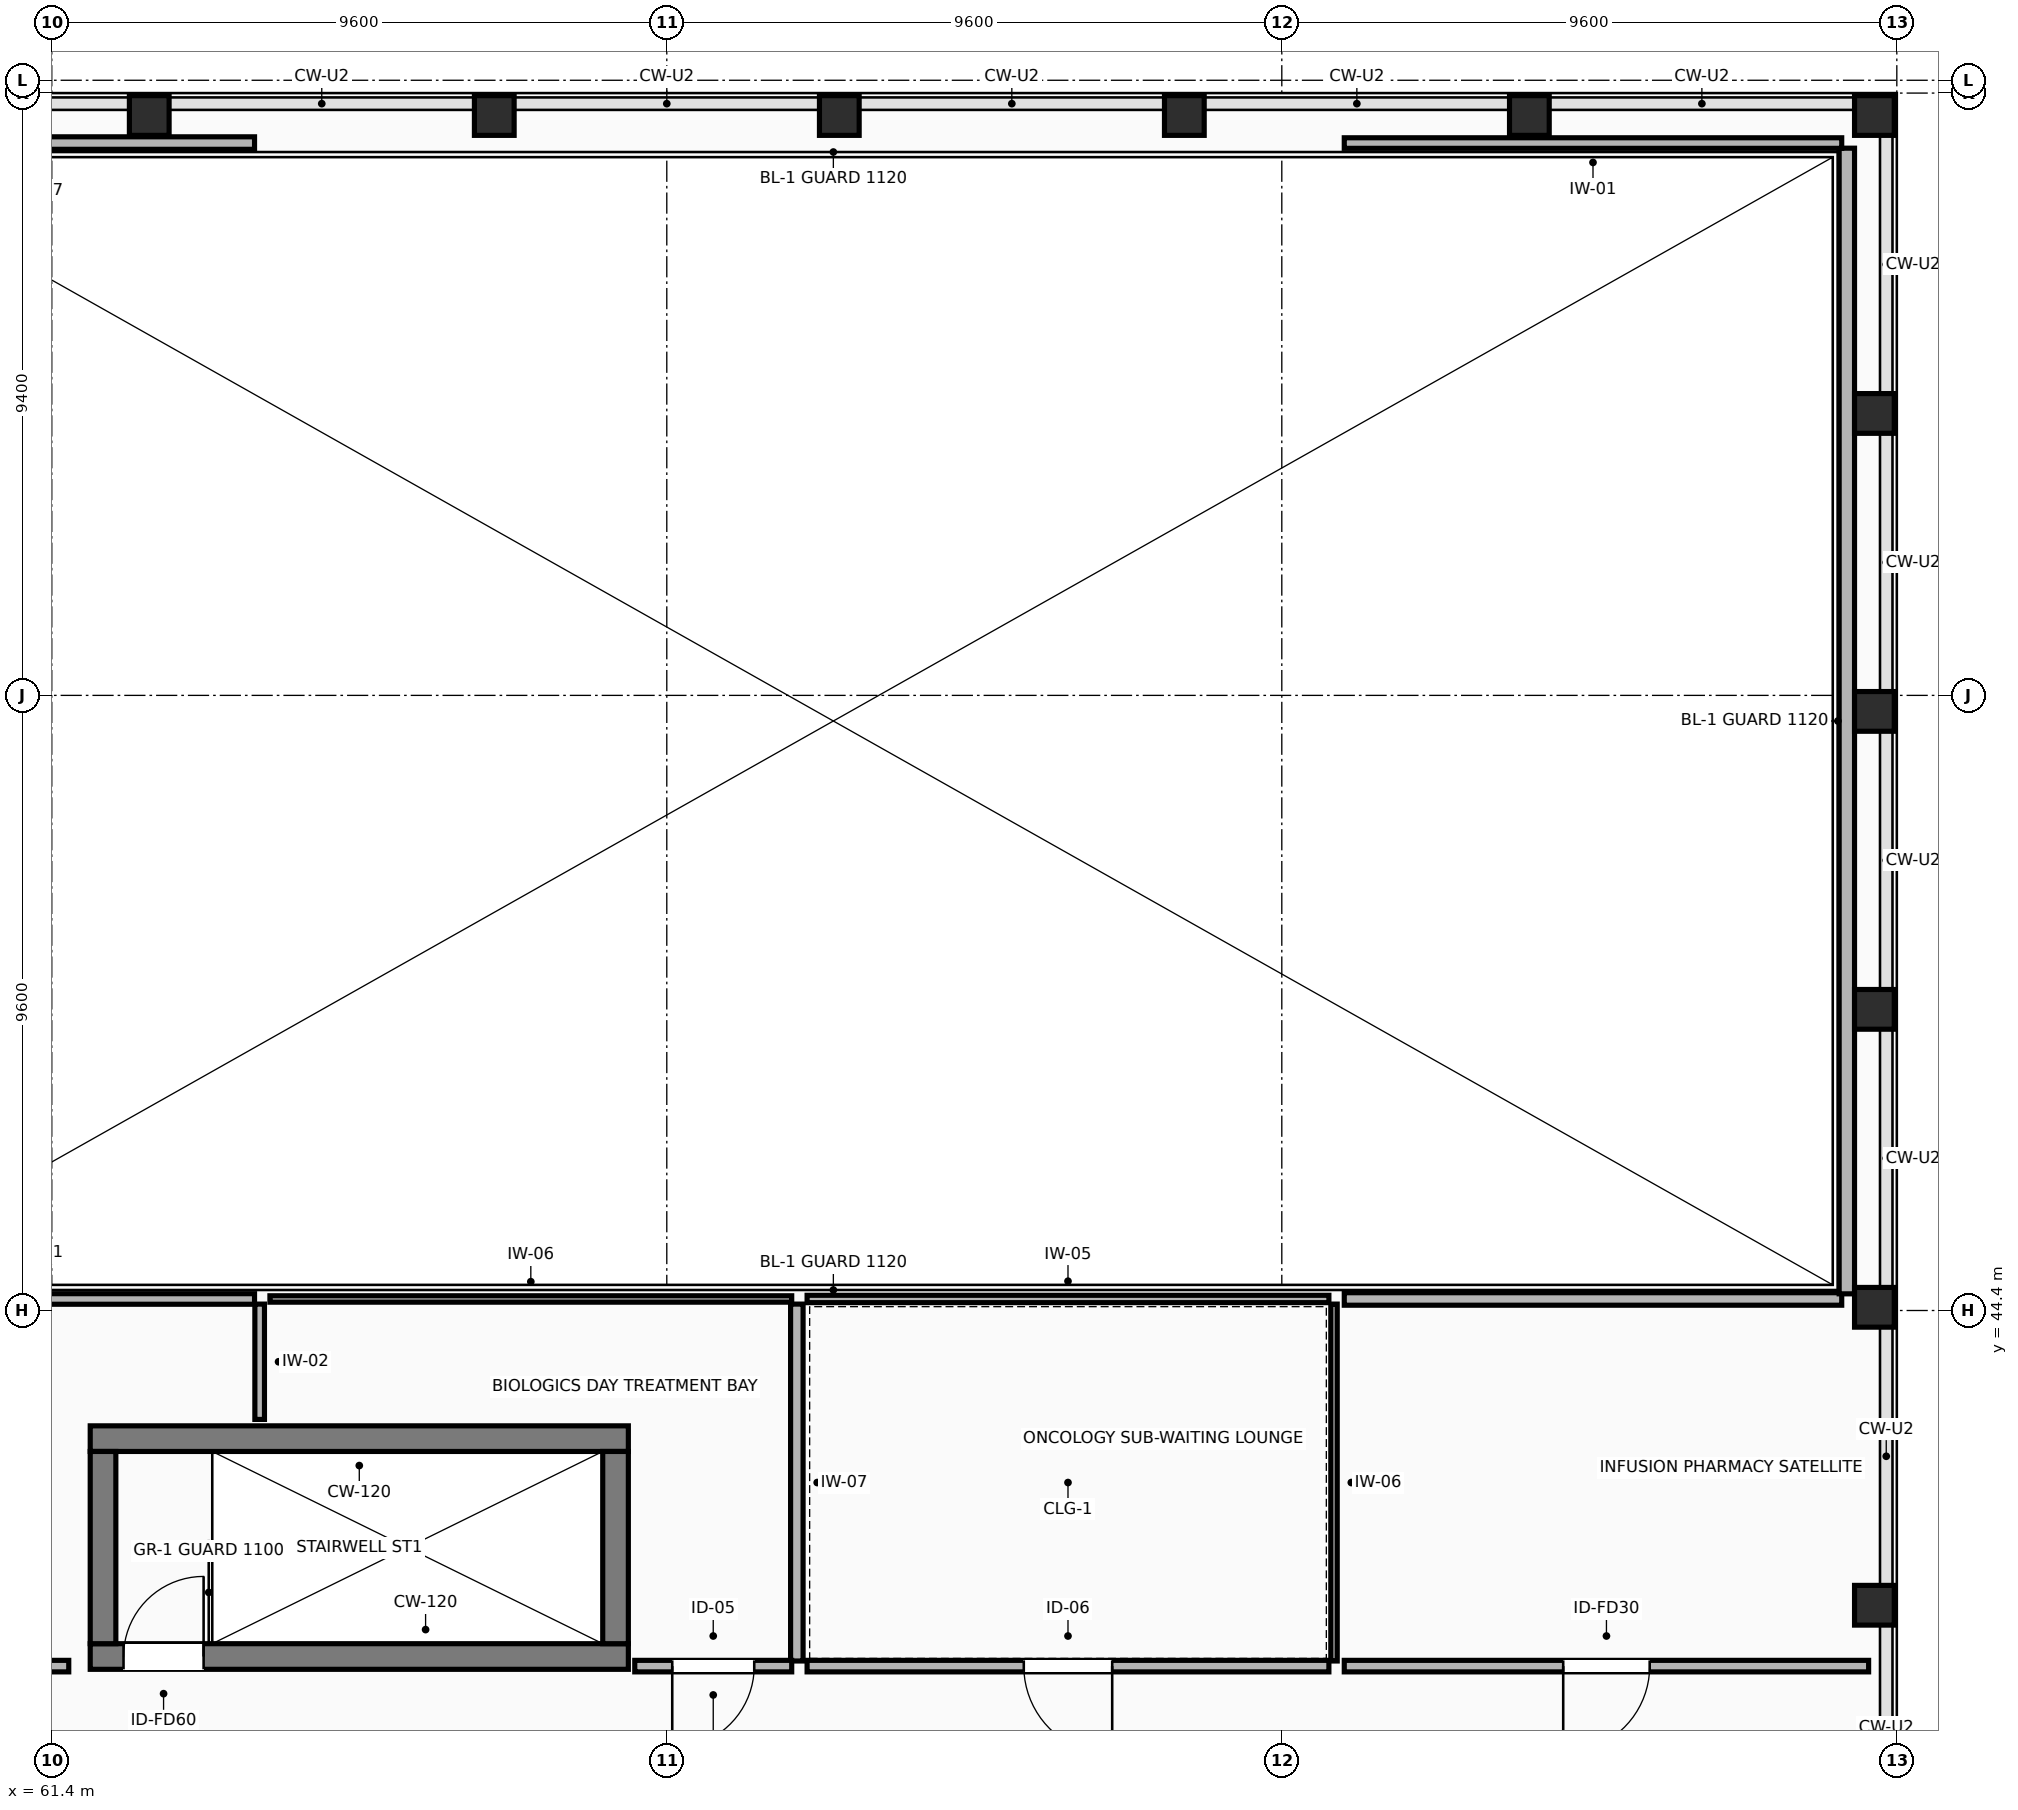
"""IFC4 building model, lengths in metres.
Left out: names, types, materials, properties, quantities, classifications, styles, units other than length and angle.
Written with IfcOpenShell. Run it as: python <this file> out.ifc"""

import sys

from ifc_helpers import new_model, si_unit, direction, frame, frame_2d, origin, origin_2d, place, context, subcontext, project, spatial, rectangle, circle, extrude, element, fill, save


model = new_model("IFC4")
c1 = context("Model", 3, precision=1e-05, world=origin(), true_north=direction((0.0, 1.0)))
c2 = subcontext(c1, "Body", "Model", "MODEL_VIEW")
j1 = project(units=[si_unit("LENGTHUNIT", "METRE"), si_unit("PLANEANGLEUNIT", "RADIAN")], contexts=[c1])
p1 = place(None, origin())
s1 = spatial("IfcSite", under=j1, at=p1, CompositionType="ELEMENT")
p2 = place(p1, origin())
s2 = spatial("IfcBuilding", under=s1, at=p2, CompositionType="ELEMENT")
p3 = place(p2, frame((0.0, 0.0, 5.4)))
s3 = spatial("IfcBuildingStorey", under=s2, at=p3, CompositionType="ELEMENT", Elevation=5.4)
for number, where, z_axis, x_axis in (
    (1, (62.921, 63.05, 0.0), (0.0, 0.0, 1.0), (1.0, 0.0, 0.0)),
    (2, (68.307, 63.05, 0.0), (0.0, 0.0, 1.0), (1.0, 0.0, 0.0)),
    (3, (73.693, 63.05, 0.0), (0.0, 0.0, 1.0), (1.0, 0.0, 0.0)),
    (4, (79.079, 63.05, 0.0), (0.0, 0.0, 1.0), (1.0, 0.0, 0.0)),
    (5, (84.464, 63.05, 0.0), (0.0, 0.0, 1.0), (1.0, 0.0, 0.0)),
    (6, (89.85, 39.8, 0.0), (0.0, 0.0, 1.0), (1.0, 0.0, 0.0)),
    (7, (89.85, 44.45, 0.0), (0.0, 0.0, 1.0), (1.0, 0.0, 0.0)),
    (8, (89.85, 49.1, 0.0), (0.0, 0.0, 1.0), (1.0, 0.0, 0.0)),
    (9, (89.85, 53.75, 0.0), (0.0, 0.0, 1.0), (1.0, 0.0, 0.0)),
    (10, (89.85, 58.4, 0.0), (0.0, 0.0, 1.0), (1.0, 0.0, 0.0)),
    (11, (89.85, 63.05, 0.0), (0.0, 0.0, 1.0), (1.0, 0.0, 0.0)),
):
    element("IfcColumn", number, at=place(p3, frame(where, z_axis=z_axis, x_axis=x_axis)), inside=s3, PredefinedType="COLUMN", context=c2, shape_type="SweptSolid", body=[
        extrude(circle(Radius=0.31, at=origin_2d()), origin(), (0.0, 0.0, 1.0), 4.2),
    ])
p4 = place(p3, frame((62.0, 39.0, 0.0), z_axis=(0.0, 0.0, 1.0), x_axis=(1.0, 0.0, 0.0)))
e12 = element("IfcWall", 12, at=p4, inside=s3, PredefinedType="SHEAR", context=c2, shape_type="SweptSolid", body=[
    extrude(rectangle(XDim=8.4, YDim=0.4, at=frame_2d((4.2, 0.0))), origin(), (0.0, 0.0, 1.0), 3.95),
])
p5 = place(p4, frame((0.52, 0.0, 0.0)))
e13 = element("IfcOpeningElement", 13, at=p5, cuts=e12, PredefinedType="OPENING", context=c2, shape_type="SweptSolid", body=[
    extrude(rectangle(XDim=1.25, YDim=2.2, at=frame_2d((0.625, 1.1))), frame((0.0, 0.21, 0.0), z_axis=(0.0, -1.0, 0.0), x_axis=(1.0, 0.0, 0.0)), (0.0, 0.0, 1.0), 0.42),
])
p6 = place(p3, frame((70.4, 42.4, 0.0), z_axis=(0.0, 0.0, 1.0), x_axis=(-1.0, 0.0, 0.0)))
e14 = element("IfcWall", 14, at=p6, inside=s3, PredefinedType="SHEAR", context=c2, shape_type="SweptSolid", body=[
    extrude(rectangle(XDim=8.4, YDim=0.4, at=frame_2d((4.2, 0.0))), origin(), (0.0, 0.0, 1.0), 3.95),
])
for number, where, z_axis, x_axis in (
    (15, (62.2, 39.2, 0.0), (0.0, 0.0, 1.0), (0.0, 1.0, 0.0)),
    (16, (70.2, 42.2, 0.0), (0.0, 0.0, 1.0), (0.0, -1.0, 0.0)),
):
    element("IfcWall", number, at=place(p3, frame(where, z_axis=z_axis, x_axis=x_axis)), inside=s3, PredefinedType="SHEAR", context=c2, shape_type="SweptSolid", body=[
        extrude(rectangle(XDim=3.0, YDim=0.4, at=frame_2d((1.5, 0.0))), origin(), (0.0, 0.0, 1.0), 3.95),
    ])
p7 = place(p3, frame((61.665, 38.85, 0.0), z_axis=(0.0, 0.0, 1.0), x_axis=(-1.0, 0.0, 0.0)))
e17 = element("IfcWall", 17, at=p7, inside=s3, PredefinedType="PARTITIONING", context=c2, shape_type="SweptSolid", body=[
    extrude(rectangle(XDim=5.285, YDim=0.18, at=frame_2d((2.643, 0.0))), origin(), (0.0, 0.0, 1.0), 3.95),
])
p8 = place(p3, frame((64.565, 62.62, 0.0), z_axis=(0.0, 0.0, 1.0), x_axis=(-1.0, 0.0, 0.0)))
e18 = element("IfcWall", 18, at=p8, inside=s3, PredefinedType="PARTITIONING", context=c2, shape_type="SweptSolid", body=[
    extrude(rectangle(XDim=6.705, YDim=0.195, at=frame_2d((3.353, 0.0))), origin(), (0.0, 0.0, 1.0), 3.95),
])
p9 = place(p3, frame((57.86, 44.58, 0.0), z_axis=(0.0, 0.0, 1.0), x_axis=(1.0, 0.0, 0.0)))
e19 = element("IfcWall", 19, at=p9, inside=s3, PredefinedType="PARTITIONING", context=c2, shape_type="SweptSolid", body=[
    extrude(rectangle(XDim=6.705, YDim=0.165, at=frame_2d((3.353, 0.0))), origin(), (0.0, 0.0, 1.0), 3.95),
])
p10 = place(p3, frame((64.645, 44.5, 0.0), z_axis=(0.0, 0.0, 1.0), x_axis=(0.0, -1.0, 0.0)))
e20 = element("IfcWall", 20, at=p10, inside=s3, PredefinedType="PARTITIONING", context=c2, shape_type="SweptSolid", body=[
    extrude(rectangle(XDim=1.8, YDim=0.15, at=frame_2d((0.9, 0.0))), origin(), (0.0, 0.0, 1.0), 3.95),
])
p11 = place(p3, frame((64.805, 44.58, 0.0), z_axis=(0.0, 0.0, 1.0), x_axis=(1.0, 0.0, 0.0)))
e21 = element("IfcWall", 21, at=p11, inside=s3, PredefinedType="PARTITIONING", context=c2, shape_type="SweptSolid", body=[
    extrude(rectangle(XDim=8.145, YDim=0.1, at=frame_2d((4.073, 0.0))), origin(), (0.0, 0.0, 1.0), 3.95),
])
p12 = place(p3, frame((73.03, 44.5, 0.0), z_axis=(0.0, 0.0, 1.0), x_axis=(0.0, -1.0, 0.0)))
e22 = element("IfcWall", 22, at=p12, inside=s3, PredefinedType="PARTITIONING", context=c2, shape_type="SweptSolid", body=[
    extrude(rectangle(XDim=5.57, YDim=0.195, at=frame_2d((2.785, 0.0))), origin(), (0.0, 0.0, 1.0), 3.95),
])
p13 = place(p3, frame((72.95, 38.85, 0.0), z_axis=(0.0, 0.0, 1.0), x_axis=(-1.0, 0.0, 0.0)))
e23 = element("IfcWall", 23, at=p13, inside=s3, PredefinedType="PARTITIONING", context=c2, shape_type="SweptSolid", body=[
    extrude(rectangle(XDim=2.45, YDim=0.18, at=frame_2d((1.225, 0.0))), origin(), (0.0, 0.0, 1.0), 3.95),
])
p14 = place(p13, frame((0.585, 0.0, 0.0)))
e24 = element("IfcOpeningElement", 24, at=p14, cuts=e23, PredefinedType="OPENING", context=c2, shape_type="SweptSolid", body=[
    extrude(rectangle(XDim=1.28, YDim=2.25, at=frame_2d((0.64, 1.125))), frame((0.0, 0.1, 0.0), z_axis=(0.0, -1.0, 0.0), x_axis=(1.0, 0.0, 0.0)), (0.0, 0.0, 1.0), 0.2),
])
p15 = place(p3, frame((73.19, 44.58, 0.0), z_axis=(0.0, 0.0, 1.0), x_axis=(1.0, 0.0, 0.0)))
e25 = element("IfcWall", 25, at=p15, inside=s3, PredefinedType="PARTITIONING", context=c2, shape_type="SweptSolid", body=[
    extrude(rectangle(XDim=8.145, YDim=0.115, at=frame_2d((4.073, 0.0))), origin(), (0.0, 0.0, 1.0), 3.95),
])
p16 = place(p3, frame((81.415, 44.5, 0.0), z_axis=(0.0, 0.0, 1.0), x_axis=(0.0, -1.0, 0.0)))
e26 = element("IfcWall", 26, at=p16, inside=s3, PredefinedType="PARTITIONING", context=c2, shape_type="SweptSolid", body=[
    extrude(rectangle(XDim=5.57, YDim=0.1, at=frame_2d((2.785, 0.0))), origin(), (0.0, 0.0, 1.0), 3.95),
])
p17 = place(p3, frame((81.335, 38.85, 0.0), z_axis=(0.0, 0.0, 1.0), x_axis=(-1.0, 0.0, 0.0)))
e27 = element("IfcWall", 27, at=p17, inside=s3, PredefinedType="PARTITIONING", context=c2, shape_type="SweptSolid", body=[
    extrude(rectangle(XDim=8.145, YDim=0.18, at=frame_2d((4.073, 0.0))), origin(), (0.0, 0.0, 1.0), 3.95),
])
p18 = place(p17, frame((3.383, 0.0, 0.0)))
e28 = element("IfcOpeningElement", 28, at=p18, cuts=e27, PredefinedType="OPENING", context=c2, shape_type="SweptSolid", body=[
    extrude(rectangle(XDim=1.38, YDim=2.25, at=frame_2d((0.69, 1.125))), frame((0.0, 0.1, 0.0), z_axis=(0.0, -1.0, 0.0), x_axis=(1.0, 0.0, 0.0)), (0.0, 0.0, 1.0), 0.2),
])
p19 = place(p3, frame((81.575, 44.58, 0.0), z_axis=(0.0, 0.0, 1.0), x_axis=(1.0, 0.0, 0.0)))
e29 = element("IfcWall", 29, at=p19, inside=s3, PredefinedType="PARTITIONING", context=c2, shape_type="SweptSolid", body=[
    extrude(rectangle(XDim=7.765, YDim=0.195, at=frame_2d((3.883, 0.0))), origin(), (0.0, 0.0, 1.0), 3.95),
])
p20 = place(p3, frame((89.42, 44.66, 0.0), z_axis=(0.0, 0.0, 1.0), x_axis=(0.0, 1.0, 0.0)))
e30 = element("IfcWall", 30, at=p20, inside=s3, PredefinedType="PARTITIONING", context=c2, shape_type="SweptSolid", body=[
    extrude(rectangle(XDim=17.88, YDim=0.24, at=frame_2d((8.94, 0.0))), origin(), (0.0, 0.0, 1.0), 3.065),
])
p21 = place(p3, frame((89.34, 62.62, 0.0), z_axis=(0.0, 0.0, 1.0), x_axis=(-1.0, 0.0, 0.0)))
e31 = element("IfcWall", 31, at=p21, inside=s3, PredefinedType="PARTITIONING", context=c2, shape_type="SweptSolid", body=[
    extrude(rectangle(XDim=7.765, YDim=0.165, at=frame_2d((3.883, 0.0))), origin(), (0.0, 0.0, 1.0), 3.065),
])
p22 = place(p3, frame((89.76, 38.85, 0.0), z_axis=(0.0, 0.0, 1.0), x_axis=(-1.0, 0.0, 0.0)))
e32 = element("IfcWall", 32, at=p22, inside=s3, PredefinedType="PARTITIONING", context=c2, shape_type="SweptSolid", body=[
    extrude(rectangle(XDim=8.185, YDim=0.18, at=frame_2d((4.093, 0.0))), origin(), (0.0, 0.0, 1.0), 3.95),
])
p23 = place(p22, frame((3.417, 0.0, 0.0)))
e33 = element("IfcOpeningElement", 33, at=p23, cuts=e32, PredefinedType="OPENING", context=c2, shape_type="SweptSolid", body=[
    extrude(rectangle(XDim=1.35, YDim=2.2, at=frame_2d((0.675, 1.1))), frame((0.0, 0.1, 0.0), z_axis=(0.0, -1.0, 0.0), x_axis=(1.0, 0.0, 0.0)), (0.0, 0.0, 1.0), 0.2),
])
p24 = place(p5, origin())
e34 = element("IfcDoor", 34, at=p24, inside=s3, OperationType="SINGLE_SWING_RIGHT", PredefinedType="DOOR", context=c2, shape_type="SweptSolid", body=[
    extrude(rectangle(XDim=1.25, YDim=2.2, at=frame_2d((0.625, 1.1))), frame((0.0, 0.025, 0.0), z_axis=(0.0, -1.0, 0.0), x_axis=(1.0, 0.0, 0.0)), (0.0, 0.0, 1.0), 0.05),
])
fill(e13, e34)
p25 = place(p14, origin())
e35 = element("IfcDoor", 35, at=p25, inside=s3, OperationType="SINGLE_SWING_RIGHT", PredefinedType="DOOR", context=c2, shape_type="SweptSolid", body=[
    extrude(rectangle(XDim=1.28, YDim=2.25, at=frame_2d((0.64, 1.125))), frame((0.0, 0.025, 0.0), z_axis=(0.0, -1.0, 0.0), x_axis=(1.0, 0.0, 0.0)), (0.0, 0.0, 1.0), 0.05),
])
fill(e24, e35)
p26 = place(p18, origin())
e36 = element("IfcDoor", 36, at=p26, inside=s3, OperationType="SINGLE_SWING_LEFT", PredefinedType="DOOR", context=c2, shape_type="SweptSolid", body=[
    extrude(rectangle(XDim=1.38, YDim=2.25, at=frame_2d((0.69, 1.125))), frame((0.0, 0.025, 0.0), z_axis=(0.0, -1.0, 0.0), x_axis=(1.0, 0.0, 0.0)), (0.0, 0.0, 1.0), 0.05),
])
fill(e28, e36)
p27 = place(p23, origin())
e37 = element("IfcDoor", 37, at=p27, inside=s3, OperationType="SINGLE_SWING_RIGHT", PredefinedType="DOOR", context=c2, shape_type="SweptSolid", body=[
    extrude(rectangle(XDim=1.35, YDim=2.2, at=frame_2d((0.675, 1.1))), frame((0.0, 0.025, 0.0), z_axis=(0.0, -1.0, 0.0), x_axis=(1.0, 0.0, 0.0)), (0.0, 0.0, 1.0), 0.05),
])
fill(e33, e37)
save(model, sys.argv[1])
